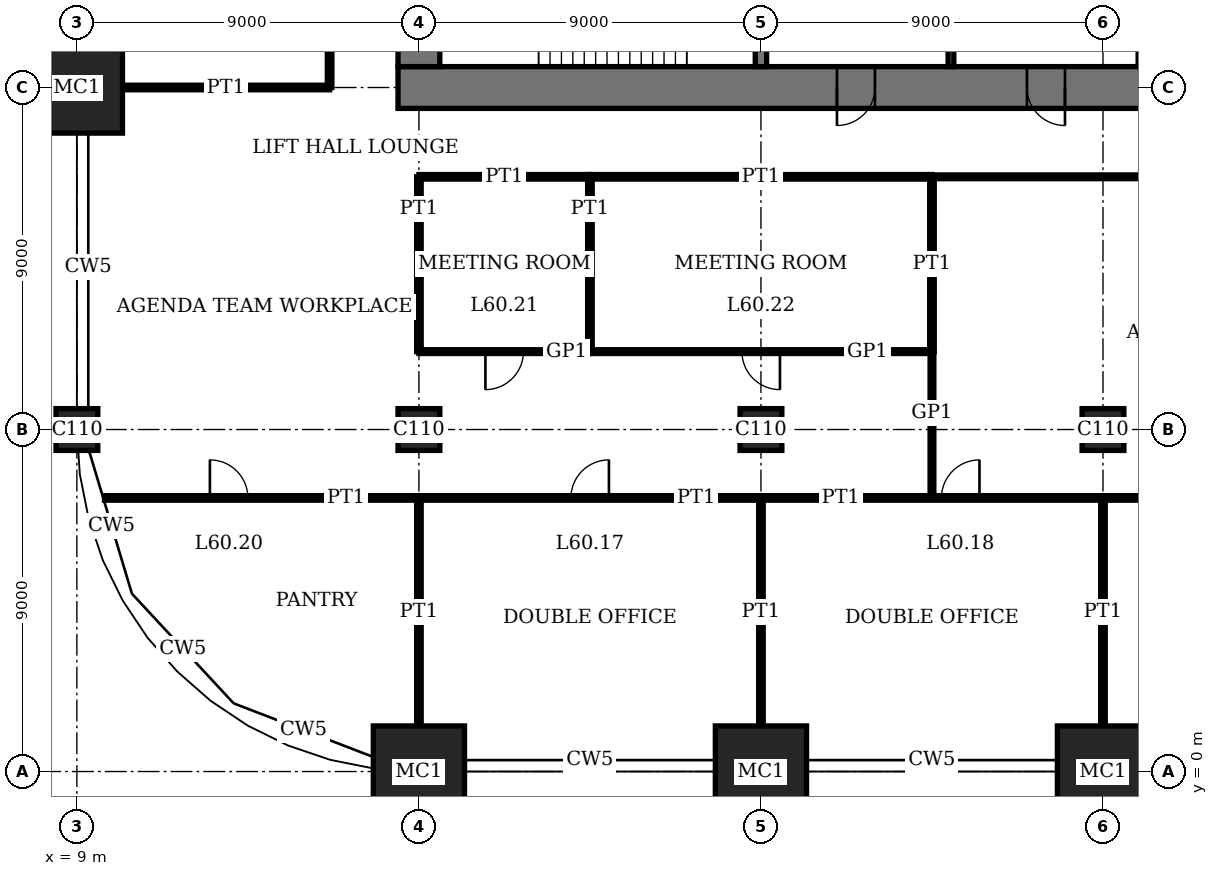
"""IFC4 building model, lengths in metres.
Left out: names, types, materials, properties, quantities, classifications, styles, units other than length and angle.
Written with IfcOpenShell. Run it as: python <this file> out.ifc"""

import sys

from ifc_helpers import new_model, si_unit, direction, frame, frame_2d, origin, origin_2d, place, context, subcontext, project, spatial, rectangle, extrude, element, fill, save


model = new_model("IFC4")
c1 = context("Model", 3, precision=1e-05, world=origin(), true_north=direction((0.0, 1.0)))
c2 = subcontext(c1, "Body", "Model", "MODEL_VIEW")
j1 = project(units=[si_unit("LENGTHUNIT", "METRE"), si_unit("PLANEANGLEUNIT", "RADIAN")], contexts=[c1])
p1 = place(None, origin())
s1 = spatial("IfcSite", under=j1, at=p1, CompositionType="ELEMENT")
p2 = place(p1, origin())
s2 = spatial("IfcBuilding", under=s1, at=p2, CompositionType="ELEMENT")
p3 = place(p2, frame((0.0, 0.0, 247.4)))
s3 = spatial("IfcBuildingStorey", under=s2, at=p3, CompositionType="ELEMENT", Elevation=247.4)
p4 = place(p3, frame((9.0, 9.0, 0.0), z_axis=(0.0, 0.0, 1.0), x_axis=(1.0, 0.0, 0.0)))
e1 = element("IfcColumn", 1, at=p4, inside=s3, PredefinedType="COLUMN", context=c2, shape_type="SweptSolid", body=[
    extrude(rectangle(XDim=1.1, YDim=1.1, at=origin_2d()), origin(), (0.0, 0.0, 1.0), 4.0),
])
for number, where, z_axis, x_axis in (
    (2, (9.0, 18.0, 0.0), (0.0, 0.0, 1.0), (1.0, 0.0, 0.0)),
    (3, (18.0, 0.0, 0.0), (0.0, 0.0, 1.0), (1.0, 0.0, 0.0)),
):
    element("IfcColumn", number, at=place(p3, frame(where, z_axis=z_axis, x_axis=x_axis)), inside=s3, PredefinedType="COLUMN", context=c2, shape_type="SweptSolid", body=[
        extrude(rectangle(XDim=2.4, YDim=2.4, at=origin_2d()), origin(), (0.0, 0.0, 1.0), 4.0),
    ])
p5 = place(p3, frame((18.0, 9.0, 0.0), z_axis=(0.0, 0.0, 1.0), x_axis=(1.0, 0.0, 0.0)))
e4 = element("IfcColumn", 4, at=p5, inside=s3, PredefinedType="COLUMN", context=c2, shape_type="SweptSolid", body=[
    extrude(rectangle(XDim=1.1, YDim=1.1, at=origin_2d()), origin(), (0.0, 0.0, 1.0), 4.0),
])
p6 = place(p3, frame((27.0, 0.0, 0.0), z_axis=(0.0, 0.0, 1.0), x_axis=(1.0, 0.0, 0.0)))
e5 = element("IfcColumn", 5, at=p6, inside=s3, PredefinedType="COLUMN", context=c2, shape_type="SweptSolid", body=[
    extrude(rectangle(XDim=2.4, YDim=2.4, at=origin_2d()), origin(), (0.0, 0.0, 1.0), 4.0),
])
p7 = place(p3, frame((27.0, 9.0, 0.0), z_axis=(0.0, 0.0, 1.0), x_axis=(1.0, 0.0, 0.0)))
e6 = element("IfcColumn", 6, at=p7, inside=s3, PredefinedType="COLUMN", context=c2, shape_type="SweptSolid", body=[
    extrude(rectangle(XDim=1.1, YDim=1.1, at=origin_2d()), origin(), (0.0, 0.0, 1.0), 4.0),
])
p8 = place(p3, frame((36.0, 0.0, 0.0), z_axis=(0.0, 0.0, 1.0), x_axis=(1.0, 0.0, 0.0)))
e7 = element("IfcColumn", 7, at=p8, inside=s3, PredefinedType="COLUMN", context=c2, shape_type="SweptSolid", body=[
    extrude(rectangle(XDim=2.4, YDim=2.4, at=origin_2d()), origin(), (0.0, 0.0, 1.0), 4.0),
])
p9 = place(p3, frame((36.0, 9.0, 0.0), z_axis=(0.0, 0.0, 1.0), x_axis=(1.0, 0.0, 0.0)))
e8 = element("IfcColumn", 8, at=p9, inside=s3, PredefinedType="COLUMN", context=c2, shape_type="SweptSolid", body=[
    extrude(rectangle(XDim=1.1, YDim=1.1, at=origin_2d()), origin(), (0.0, 0.0, 1.0), 4.0),
])
p10 = place(p3, frame((17.45, 18.0, 0.0), z_axis=(0.0, 0.0, 1.0), x_axis=(1.0, 0.0, 0.0)))
e9 = element("IfcWall", 9, at=p10, inside=s3, PredefinedType="SHEAR", context=c2, shape_type="SweptSolid", body=[
    extrude(rectangle(XDim=28.1, YDim=1.1, at=frame_2d((14.05, 0.0))), origin(), (0.0, 0.0, 1.0), 4.0),
])
p11 = place(p10, frame((11.55, 0.0, 0.0)))
e10 = element("IfcOpeningElement", 10, at=p11, cuts=e9, PredefinedType="OPENING", context=c2, shape_type="SweptSolid", body=[
    extrude(rectangle(XDim=1.0, YDim=2.4, at=frame_2d((0.5, 1.2))), frame((0.0, 0.56, 0.0), z_axis=(0.0, -1.0, 0.0), x_axis=(1.0, 0.0, 0.0)), (0.0, 0.0, 1.0), 1.12),
])
p12 = place(p10, frame((16.55, 0.0, 0.0)))
e11 = element("IfcOpeningElement", 11, at=p12, cuts=e9, PredefinedType="OPENING", context=c2, shape_type="SweptSolid", body=[
    extrude(rectangle(XDim=1.0, YDim=2.4, at=frame_2d((0.5, 1.2))), frame((0.0, 0.56, 0.0), z_axis=(0.0, -1.0, 0.0), x_axis=(1.0, 0.0, 0.0)), (0.0, 0.0, 1.0), 1.12),
])
p13 = place(p10, frame((20.0, 0.0, 0.0)))
e12 = element("IfcOpeningElement", 12, at=p13, cuts=e9, PredefinedType="OPENING", context=c2, shape_type="SweptSolid", body=[
    extrude(rectangle(XDim=1.1, YDim=2.4, at=frame_2d((0.55, 1.2))), frame((0.0, 0.56, 0.0), z_axis=(0.0, -1.0, 0.0), x_axis=(1.0, 0.0, 0.0)), (0.0, 0.0, 1.0), 1.12),
])
p14 = place(p10, frame((24.05, 0.0, 0.0)))
e13 = element("IfcOpeningElement", 13, at=p14, cuts=e9, PredefinedType="OPENING", context=c2, shape_type="SweptSolid", body=[
    extrude(rectangle(XDim=1.0, YDim=2.4, at=frame_2d((0.5, 1.2))), frame((0.0, 0.56, 0.0), z_axis=(0.0, -1.0, 0.0), x_axis=(1.0, 0.0, 0.0)), (0.0, 0.0, 1.0), 1.12),
])
p15 = place(p3, frame((18.0, 35.45, 0.0), z_axis=(0.0, 0.0, 1.0), x_axis=(0.0, -1.0, 0.0)))
e14 = element("IfcWall", 14, at=p15, inside=s3, PredefinedType="SHEAR", context=c2, shape_type="SweptSolid", body=[
    extrude(rectangle(XDim=16.9, YDim=1.1, at=frame_2d((8.45, 0.0))), origin(), (0.0, 0.0, 1.0), 4.0),
])
p16 = place(p15, frame((8.45, 0.0, 0.0)))
e15 = element("IfcOpeningElement", 15, at=p16, cuts=e14, PredefinedType="OPENING", context=c2, shape_type="SweptSolid", body=[
    extrude(rectangle(XDim=1.8, YDim=2.4, at=frame_2d((0.9, 1.2))), frame((0.0, 0.56, 0.0), z_axis=(0.0, -1.0, 0.0), x_axis=(1.0, 0.0, 0.0)), (0.0, 0.0, 1.0), 1.12),
])
p17 = place(p3, frame((27.0, 18.55, 0.0), z_axis=(0.0, 0.0, 1.0), x_axis=(0.0, 1.0, 0.0)))
e16 = element("IfcWall", 16, at=p17, inside=s3, PredefinedType="SHEAR", context=c2, shape_type="SweptSolid", body=[
    extrude(rectangle(XDim=3.05, YDim=0.3, at=frame_2d((1.525, 0.0))), origin(), (0.0, 0.0, 1.0), 4.0),
])
p18 = place(p3, frame((18.0, 7.2, 0.0), z_axis=(0.0, 0.0, 1.0), x_axis=(1.0, 0.0, 0.0)))
e17 = element("IfcWall", 17, at=p18, inside=s3, PredefinedType="PARTITIONING", context=c2, shape_type="SweptSolid", body=[
    extrude(rectangle(XDim=9.0, YDim=0.12, at=frame_2d((4.5, 0.0))), origin(), (0.0, 0.0, 1.0), 3.75),
])
p19 = place(p18, frame((4.0, 0.0, 0.0)))
e18 = element("IfcOpeningElement", 18, at=p19, cuts=e17, PredefinedType="OPENING", context=c2, shape_type="SweptSolid", body=[
    extrude(rectangle(XDim=1.0, YDim=2.4, at=frame_2d((0.5, 1.2))), frame((0.0, 0.07, 0.0), z_axis=(0.0, -1.0, 0.0), x_axis=(1.0, 0.0, 0.0)), (0.0, 0.0, 1.0), 0.14),
])
p20 = place(p3, frame((27.0, 7.2, 0.0), z_axis=(0.0, 0.0, 1.0), x_axis=(1.0, 0.0, 0.0)))
e19 = element("IfcWall", 19, at=p20, inside=s3, PredefinedType="PARTITIONING", context=c2, shape_type="SweptSolid", body=[
    extrude(rectangle(XDim=9.0, YDim=0.12, at=frame_2d((4.5, 0.0))), origin(), (0.0, 0.0, 1.0), 3.75),
])
p21 = place(p20, frame((4.75, 0.0, 0.0)))
e20 = element("IfcOpeningElement", 20, at=p21, cuts=e19, PredefinedType="OPENING", context=c2, shape_type="SweptSolid", body=[
    extrude(rectangle(XDim=1.0, YDim=2.4, at=frame_2d((0.5, 1.2))), frame((0.0, 0.07, 0.0), z_axis=(0.0, -1.0, 0.0), x_axis=(1.0, 0.0, 0.0)), (0.0, 0.0, 1.0), 0.14),
])
p22 = place(p3, frame((36.0, 7.2, 0.0), z_axis=(0.0, 0.0, 1.0), x_axis=(1.0, 0.0, 0.0)))
e21 = element("IfcWall", 21, at=p22, inside=s3, PredefinedType="PARTITIONING", context=c2, shape_type="SweptSolid", body=[
    extrude(rectangle(XDim=9.0, YDim=0.12, at=frame_2d((4.5, 0.0))), origin(), (0.0, 0.0, 1.0), 3.75),
])
p23 = place(p22, frame((4.0, 0.0, 0.0)))
e22 = element("IfcOpeningElement", 22, at=p23, cuts=e21, PredefinedType="OPENING", context=c2, shape_type="SweptSolid", body=[
    extrude(rectangle(XDim=1.0, YDim=2.4, at=frame_2d((0.5, 1.2))), frame((0.0, 0.07, 0.0), z_axis=(0.0, -1.0, 0.0), x_axis=(1.0, 0.0, 0.0)), (0.0, 0.0, 1.0), 0.14),
])
p24 = place(p3, frame((9.727, 7.2, 0.0), z_axis=(0.0, 0.0, 1.0), x_axis=(1.0, 0.0, 0.0)))
e23 = element("IfcWall", 23, at=p24, inside=s3, PredefinedType="PARTITIONING", context=c2, shape_type="SweptSolid", body=[
    extrude(rectangle(XDim=8.273, YDim=0.12, at=frame_2d((4.136, 0.0))), origin(), (0.0, 0.0, 1.0), 3.75),
])
p25 = place(p24, frame((2.773, 0.0, 0.0)))
e24 = element("IfcOpeningElement", 24, at=p25, cuts=e23, PredefinedType="OPENING", context=c2, shape_type="SweptSolid", body=[
    extrude(rectangle(XDim=1.0, YDim=2.4, at=frame_2d((0.5, 1.2))), frame((0.0, 0.07, 0.0), z_axis=(0.0, -1.0, 0.0), x_axis=(1.0, 0.0, 0.0)), (0.0, 0.0, 1.0), 0.14),
])
p26 = place(p3, frame((18.0, 11.05, 0.0), z_axis=(0.0, 0.0, 1.0), x_axis=(1.0, 0.0, 0.0)))
e25 = element("IfcWall", 25, at=p26, inside=s3, PredefinedType="PARTITIONING", context=c2, shape_type="SweptSolid", body=[
    extrude(rectangle(XDim=4.5, YDim=0.1, at=frame_2d((2.25, 0.0))), origin(), (0.0, 0.0, 1.0), 3.75),
])
p27 = place(p26, frame((1.75, 0.0, 0.0)))
e26 = element("IfcOpeningElement", 26, at=p27, cuts=e25, PredefinedType="OPENING", context=c2, shape_type="SweptSolid", body=[
    extrude(rectangle(XDim=1.0, YDim=2.4, at=frame_2d((0.5, 1.2))), frame((0.0, 0.06, 0.0), z_axis=(0.0, -1.0, 0.0), x_axis=(1.0, 0.0, 0.0)), (0.0, 0.0, 1.0), 0.12),
])
p28 = place(p3, frame((22.5, 11.05, 0.0), z_axis=(0.0, 0.0, 1.0), x_axis=(1.0, 0.0, 0.0)))
e27 = element("IfcWall", 27, at=p28, inside=s3, PredefinedType="PARTITIONING", context=c2, shape_type="SweptSolid", body=[
    extrude(rectangle(XDim=9.0, YDim=0.1, at=frame_2d((4.5, 0.0))), origin(), (0.0, 0.0, 1.0), 3.75),
])
p29 = place(p28, frame((4.0, 0.0, 0.0)))
e28 = element("IfcOpeningElement", 28, at=p29, cuts=e27, PredefinedType="OPENING", context=c2, shape_type="SweptSolid", body=[
    extrude(rectangle(XDim=1.0, YDim=2.4, at=frame_2d((0.5, 1.2))), frame((0.0, 0.06, 0.0), z_axis=(0.0, -1.0, 0.0), x_axis=(1.0, 0.0, 0.0)), (0.0, 0.0, 1.0), 0.12),
])
p30 = place(p3, frame((18.0, 15.65, 0.0), z_axis=(0.0, 0.0, 1.0), x_axis=(1.0, 0.0, 0.0)))
e29 = element("IfcWall", 29, at=p30, inside=s3, PredefinedType="PARTITIONING", context=c2, shape_type="SweptSolid", body=[
    extrude(rectangle(XDim=4.5, YDim=0.12, at=frame_2d((2.25, 0.0))), origin(), (0.0, 0.0, 1.0), 3.75),
])
p31 = place(p3, frame((22.5, 15.65, 0.0), z_axis=(0.0, 0.0, 1.0), x_axis=(1.0, 0.0, 0.0)))
e30 = element("IfcWall", 30, at=p31, inside=s3, PredefinedType="PARTITIONING", context=c2, shape_type="SweptSolid", body=[
    extrude(rectangle(XDim=9.0, YDim=0.12, at=frame_2d((4.5, 0.0))), origin(), (0.0, 0.0, 1.0), 3.75),
])
p32 = place(p3, frame((31.51, 15.65, 0.0), z_axis=(0.0, 0.0, 1.0), x_axis=(1.0, 0.0, 0.0)))
e31 = element("IfcWall", 31, at=p32, inside=s3, PredefinedType="PARTITIONING", context=c2, shape_type="SweptSolid", body=[
    extrude(rectangle(XDim=15.89, YDim=0.1, at=frame_2d((7.945, 0.0))), origin(), (0.0, 0.0, 1.0), 3.75),
])
p33 = place(p32, frame((7.445, 0.0, 0.0)))
e32 = element("IfcOpeningElement", 32, at=p33, cuts=e31, PredefinedType="OPENING", context=c2, shape_type="SweptSolid", body=[
    extrude(rectangle(XDim=1.0, YDim=2.4, at=frame_2d((0.5, 1.2))), frame((0.0, 0.06, 0.0), z_axis=(0.0, -1.0, 0.0), x_axis=(1.0, 0.0, 0.0)), (0.0, 0.0, 1.0), 0.12),
])
p34 = place(p3, frame((10.2, 18.0, 0.0), z_axis=(0.0, 0.0, 1.0), x_axis=(1.0, 0.0, 0.0)))
e33 = element("IfcWall", 33, at=p34, inside=s3, PredefinedType="PARTITIONING", context=c2, shape_type="SweptSolid", body=[
    extrude(rectangle(XDim=5.45, YDim=0.12, at=frame_2d((2.725, 0.0))), origin(), (0.0, 0.0, 1.0), 3.05),
])
p35 = place(p3, frame((15.65, 18.0, 0.0), z_axis=(0.0, 0.0, 1.0), x_axis=(0.0, 1.0, 0.0)))
e34 = element("IfcWall", 34, at=p35, inside=s3, PredefinedType="PARTITIONING", context=c2, shape_type="SweptSolid", body=[
    extrude(rectangle(XDim=9.0, YDim=0.12, at=frame_2d((4.5, 0.0))), origin(), (0.0, 0.0, 1.0), 3.75),
])
p36 = place(p35, frame((4.0, 0.0, 0.0)))
e35 = element("IfcOpeningElement", 35, at=p36, cuts=e34, PredefinedType="OPENING", context=c2, shape_type="SweptSolid", body=[
    extrude(rectangle(XDim=1.0, YDim=2.4, at=frame_2d((0.5, 1.2))), frame((0.0, 0.07, 0.0), z_axis=(0.0, -1.0, 0.0), x_axis=(1.0, 0.0, 0.0)), (0.0, 0.0, 1.0), 0.14),
])
p37 = place(p3, frame((18.0, 1.2, 0.0), z_axis=(0.0, 0.0, 1.0), x_axis=(0.0, 1.0, 0.0)))
e36 = element("IfcWall", 36, at=p37, inside=s3, PredefinedType="PARTITIONING", context=c2, shape_type="SweptSolid", body=[
    extrude(rectangle(XDim=6.0, YDim=0.12, at=frame_2d((3.0, 0.0))), origin(), (0.0, 0.0, 1.0), 3.05),
])
p38 = place(p3, frame((18.0, 11.05, 0.0), z_axis=(0.0, 0.0, 1.0), x_axis=(0.0, 1.0, 0.0)))
e37 = element("IfcWall", 37, at=p38, inside=s3, PredefinedType="PARTITIONING", context=c2, shape_type="SweptSolid", body=[
    extrude(rectangle(XDim=4.6, YDim=0.12, at=frame_2d((2.3, 0.0))), origin(), (0.0, 0.0, 1.0), 3.05),
])
p39 = place(p3, frame((22.5, 11.05, 0.0), z_axis=(0.0, 0.0, 1.0), x_axis=(0.0, 1.0, 0.0)))
e38 = element("IfcWall", 38, at=p39, inside=s3, PredefinedType="PARTITIONING", context=c2, shape_type="SweptSolid", body=[
    extrude(rectangle(XDim=4.6, YDim=0.12, at=frame_2d((2.3, 0.0))), origin(), (0.0, 0.0, 1.0), 3.75),
])
p40 = place(p3, frame((27.0, 1.2, 0.0), z_axis=(0.0, 0.0, 1.0), x_axis=(0.0, 1.0, 0.0)))
e39 = element("IfcWall", 39, at=p40, inside=s3, PredefinedType="PARTITIONING", context=c2, shape_type="SweptSolid", body=[
    extrude(rectangle(XDim=6.0, YDim=0.12, at=frame_2d((3.0, 0.0))), origin(), (0.0, 0.0, 1.0), 3.05),
])
p41 = place(p3, frame((31.5, 11.05, 0.0), z_axis=(0.0, 0.0, 1.0), x_axis=(0.0, 1.0, 0.0)))
e40 = element("IfcWall", 40, at=p41, inside=s3, PredefinedType="PARTITIONING", context=c2, shape_type="SweptSolid", body=[
    extrude(rectangle(XDim=4.6, YDim=0.12, at=frame_2d((2.3, 0.0))), origin(), (0.0, 0.0, 1.0), 3.75),
])
p42 = place(p3, frame((31.5, 7.19, 0.0), z_axis=(0.0, 0.0, 1.0), x_axis=(0.0, 1.0, 0.0)))
e41 = element("IfcWall", 41, at=p42, inside=s3, PredefinedType="PARTITIONING", context=c2, shape_type="SweptSolid", body=[
    extrude(rectangle(XDim=3.86, YDim=0.1, at=frame_2d((1.93, 0.0))), origin(), (0.0, 0.0, 1.0), 3.75),
])
p43 = place(p3, frame((36.0, 1.2, 0.0), z_axis=(0.0, 0.0, 1.0), x_axis=(0.0, 1.0, 0.0)))
e42 = element("IfcWall", 42, at=p43, inside=s3, PredefinedType="PARTITIONING", context=c2, shape_type="SweptSolid", body=[
    extrude(rectangle(XDim=6.0, YDim=0.12, at=frame_2d((3.0, 0.0))), origin(), (0.0, 0.0, 1.0), 3.05),
])
for number, where, z_axis, x_axis in (
    (43, (32.0, 18.55, 0.0), (0.0, 0.0, 1.0), (0.0, 1.0, 0.0)),
    (44, (37.0, 18.55, 0.0), (0.0, 0.0, 1.0), (0.0, 1.0, 0.0)),
):
    element("IfcWall", number, at=place(p3, frame(where, z_axis=z_axis, x_axis=x_axis)), inside=s3, PredefinedType="PARTITIONING", context=c2, shape_type="SweptSolid", body=[
        extrude(rectangle(XDim=2.9, YDim=0.15, at=frame_2d((1.45, 0.0))), origin(), (0.0, 0.0, 1.0), 3.75),
    ])
p44 = place(p11, origin())
e45 = element("IfcDoor", 45, at=p44, inside=s3, OperationType="SINGLE_SWING_LEFT", PredefinedType="DOOR", context=c2, shape_type="SweptSolid", body=[
    extrude(rectangle(XDim=1.0, YDim=2.4, at=frame_2d((0.5, 1.2))), frame((0.0, 0.025, 0.0), z_axis=(0.0, -1.0, 0.0), x_axis=(1.0, 0.0, 0.0)), (0.0, 0.0, 1.0), 0.05),
    extrude(rectangle(XDim=0.04, YDim=2.4, at=frame_2d((0.02, 1.2))), frame((0.0, 0.4, 0.0), z_axis=(0.0, -1.0, 0.0), x_axis=(1.0, 0.0, 0.0)), (0.0, 0.0, 1.0), 0.8),
    extrude(rectangle(XDim=0.04, YDim=2.4, at=frame_2d((0.98, 1.2))), frame((0.0, 0.4, 0.0), z_axis=(0.0, -1.0, 0.0), x_axis=(1.0, 0.0, 0.0)), (0.0, 0.0, 1.0), 0.8),
    extrude(rectangle(XDim=1.0, YDim=0.04, at=frame_2d((0.5, 2.38))), frame((0.0, 0.4, 0.0), z_axis=(0.0, -1.0, 0.0), x_axis=(1.0, 0.0, 0.0)), (0.0, 0.0, 1.0), 0.8),
])
fill(e10, e45)
p45 = place(p12, origin())
e46 = element("IfcDoor", 46, at=p45, inside=s3, OperationType="SINGLE_SWING_RIGHT", PredefinedType="DOOR", context=c2, shape_type="SweptSolid", body=[
    extrude(rectangle(XDim=1.0, YDim=2.4, at=frame_2d((0.5, 1.2))), frame((0.0, 0.025, 0.0), z_axis=(0.0, -1.0, 0.0), x_axis=(1.0, 0.0, 0.0)), (0.0, 0.0, 1.0), 0.05),
    extrude(rectangle(XDim=0.04, YDim=2.4, at=frame_2d((0.02, 1.2))), frame((0.0, 0.4, 0.0), z_axis=(0.0, -1.0, 0.0), x_axis=(1.0, 0.0, 0.0)), (0.0, 0.0, 1.0), 0.8),
    extrude(rectangle(XDim=0.04, YDim=2.4, at=frame_2d((0.98, 1.2))), frame((0.0, 0.4, 0.0), z_axis=(0.0, -1.0, 0.0), x_axis=(1.0, 0.0, 0.0)), (0.0, 0.0, 1.0), 0.8),
    extrude(rectangle(XDim=1.0, YDim=0.04, at=frame_2d((0.5, 2.38))), frame((0.0, 0.4, 0.0), z_axis=(0.0, -1.0, 0.0), x_axis=(1.0, 0.0, 0.0)), (0.0, 0.0, 1.0), 0.8),
])
fill(e11, e46)
p46 = place(p19, origin())
e47 = element("IfcDoor", 47, at=p46, inside=s3, OperationType="SINGLE_SWING_LEFT", PredefinedType="DOOR", context=c2, shape_type="SweptSolid", body=[
    extrude(rectangle(XDim=1.0, YDim=2.4, at=frame_2d((0.5, 1.2))), frame((0.0, 0.025, 0.0), z_axis=(0.0, -1.0, 0.0), x_axis=(1.0, 0.0, 0.0)), (0.0, 0.0, 1.0), 0.05),
])
fill(e18, e47)
p47 = place(p21, origin())
e48 = element("IfcDoor", 48, at=p47, inside=s3, OperationType="SINGLE_SWING_LEFT", PredefinedType="DOOR", context=c2, shape_type="SweptSolid", body=[
    extrude(rectangle(XDim=1.0, YDim=2.4, at=frame_2d((0.5, 1.2))), frame((0.0, 0.025, 0.0), z_axis=(0.0, -1.0, 0.0), x_axis=(1.0, 0.0, 0.0)), (0.0, 0.0, 1.0), 0.05),
])
fill(e20, e48)
p48 = place(p25, origin())
e49 = element("IfcDoor", 49, at=p48, inside=s3, OperationType="SINGLE_SWING_RIGHT", PredefinedType="DOOR", context=c2, shape_type="SweptSolid", body=[
    extrude(rectangle(XDim=1.0, YDim=2.4, at=frame_2d((0.5, 1.2))), frame((0.0, 0.025, 0.0), z_axis=(0.0, -1.0, 0.0), x_axis=(1.0, 0.0, 0.0)), (0.0, 0.0, 1.0), 0.05),
])
fill(e24, e49)
p49 = place(p27, origin())
e50 = element("IfcDoor", 50, at=p49, inside=s3, OperationType="SINGLE_SWING_LEFT", PredefinedType="DOOR", context=c2, shape_type="SweptSolid", body=[
    extrude(rectangle(XDim=1.0, YDim=2.4, at=frame_2d((0.5, 1.2))), frame((0.0, 0.02, 0.0), z_axis=(0.0, -1.0, 0.0), x_axis=(1.0, 0.0, 0.0)), (0.0, 0.0, 1.0), 0.04),
])
fill(e26, e50)
p50 = place(p29, origin())
e51 = element("IfcDoor", 51, at=p50, inside=s3, OperationType="SINGLE_SWING_RIGHT", PredefinedType="DOOR", context=c2, shape_type="SweptSolid", body=[
    extrude(rectangle(XDim=1.0, YDim=2.4, at=frame_2d((0.5, 1.2))), frame((0.0, 0.02, 0.0), z_axis=(0.0, -1.0, 0.0), x_axis=(1.0, 0.0, 0.0)), (0.0, 0.0, 1.0), 0.04),
])
fill(e28, e51)
save(model, sys.argv[1])
